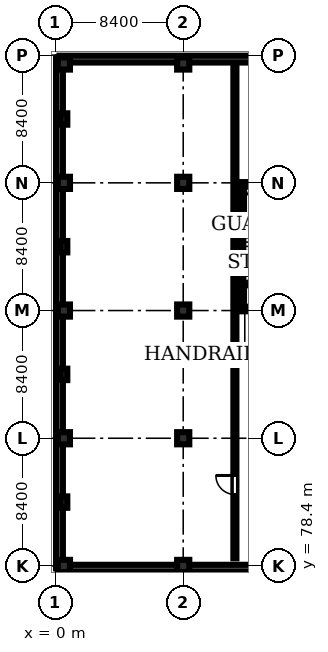
"""IFC4 building model, lengths in metres.
Left out: names, types, materials, properties, quantities, classifications, styles, units other than length and angle.
Written with IfcOpenShell. Run it as: python <this file> out.ifc"""

import sys

from ifc_helpers import new_model, si_unit, direction, frame, frame_2d, origin, origin_2d, place, context, subcontext, project, spatial, rectangle, extrude, element, fill, save


model = new_model("IFC4")
c1 = context("Model", 3, precision=1e-05, world=origin(), true_north=direction((0.0, 1.0)))
c2 = subcontext(c1, "Body", "Model", "MODEL_VIEW")
j1 = project(units=[si_unit("LENGTHUNIT", "METRE"), si_unit("PLANEANGLEUNIT", "RADIAN")], contexts=[c1])
p1 = place(None, origin())
s1 = spatial("IfcSite", under=j1, at=p1, CompositionType="ELEMENT")
p2 = place(p1, origin())
s2 = spatial("IfcBuilding", under=s1, at=p2, CompositionType="ELEMENT")
p3 = place(p2, frame((0.0, 0.0, -4.8)))
s3 = spatial("IfcBuildingStorey", under=s2, at=p3, CompositionType="ELEMENT", Elevation=-4.8)
for number, where, z_axis, x_axis in (
    (1, (0.55, 78.4, 0.0), (0.0, 0.0, 1.0), (1.0, 0.0, 0.0)),
    (2, (0.55, 86.8, 0.0), (0.0, 0.0, 1.0), (1.0, 0.0, 0.0)),
    (3, (0.55, 95.2, 0.0), (0.0, 0.0, 1.0), (1.0, 0.0, 0.0)),
    (4, (0.55, 103.6, 0.0), (0.0, 0.0, 1.0), (1.0, 0.0, 0.0)),
    (5, (0.55, 111.45, 0.0), (0.0, 0.0, 1.0), (1.0, 0.0, 0.0)),
    (6, (8.4, 78.4, 0.0), (0.0, 0.0, 1.0), (1.0, 0.0, 0.0)),
    (7, (8.4, 86.8, 0.0), (0.0, 0.0, 1.0), (1.0, 0.0, 0.0)),
    (8, (8.4, 95.2, 0.0), (0.0, 0.0, 1.0), (1.0, 0.0, 0.0)),
    (9, (8.4, 103.6, 0.0), (0.0, 0.0, 1.0), (1.0, 0.0, 0.0)),
    (10, (8.4, 111.45, 0.0), (0.0, 0.0, 1.0), (1.0, 0.0, 0.0)),
):
    element("IfcColumn", number, at=place(p3, frame(where, z_axis=z_axis, x_axis=x_axis)), inside=s3, PredefinedType="COLUMN", context=c2, shape_type="SweptSolid", body=[
        extrude(rectangle(XDim=0.8, YDim=0.8, at=origin_2d()), origin(), (0.0, 0.0, 1.0), 4.395),
    ])
for number, where, z_axis, x_axis in (
    (11, (0.55, 82.6, 0.0), (0.0, 0.0, 1.0), (1.0, 0.0, 0.0)),
    (12, (0.55, 91.0, 0.0), (0.0, 0.0, 1.0), (1.0, 0.0, 0.0)),
    (13, (0.55, 99.4, 0.0), (0.0, 0.0, 1.0), (1.0, 0.0, 0.0)),
    (14, (0.55, 107.8, 0.0), (0.0, 0.0, 1.0), (1.0, 0.0, 0.0)),
):
    element("IfcColumn", number, at=place(p3, frame(where, z_axis=z_axis, x_axis=x_axis)), inside=s3, PredefinedType="PILASTER", context=c2, shape_type="SweptSolid", body=[
        extrude(rectangle(XDim=0.45, YDim=0.75, at=origin_2d()), origin(), (0.0, 0.0, 1.0), 4.395),
    ])
p4 = place(p3, frame((0.26, 78.25, 0.0), z_axis=(0.0, 0.0, 1.0), x_axis=(1.0, 0.0, 0.0)))
e15 = element("IfcWall", 15, at=p4, inside=s3, PredefinedType="SHEAR", context=c2, shape_type="SweptSolid", body=[
    extrude(rectangle(XDim=138.39, YDim=0.45, at=frame_2d((69.195, 0.0))), origin(), (0.0, 0.0, 1.0), 3.75),
])
p5 = place(p3, frame((163.74, 111.74, 0.0), z_axis=(0.0, 0.0, 1.0), x_axis=(-1.0, 0.0, 0.0)))
e16 = element("IfcWall", 16, at=p5, inside=s3, PredefinedType="SHEAR", context=c2, shape_type="SweptSolid", body=[
    extrude(rectangle(XDim=163.48, YDim=0.45, at=frame_2d((81.74, 0.0))), origin(), (0.0, 0.0, 1.0), 3.75),
])
p6 = place(p3, frame((0.26, 111.74, 0.0), z_axis=(0.0, 0.0, 1.0), x_axis=(0.0, -1.0, 0.0)))
e17 = element("IfcWall", 17, at=p6, inside=s3, PredefinedType="SHEAR", context=c2, shape_type="SweptSolid", body=[
    extrude(rectangle(XDim=33.49, YDim=0.45, at=frame_2d((16.745, 0.0))), origin(), (0.0, 0.0, 1.0), 3.75),
])
p7 = place(p3, frame((12.1, 95.3, 0.0), z_axis=(0.0, 0.0, 1.0), x_axis=(1.0, 0.0, 0.0)))
e18 = element("IfcWall", 18, at=p7, inside=s3, PredefinedType="SHEAR", context=c2, shape_type="SweptSolid", body=[
    extrude(rectangle(XDim=3.7, YDim=0.3, at=frame_2d((1.85, 0.0))), origin(), (0.0, 0.0, 1.0), 4.395),
])
p8 = place(p7, frame((0.95, 0.0, 0.0)))
e19 = element("IfcOpeningElement", 19, at=p8, cuts=e18, PredefinedType="OPENING", context=c2, shape_type="SweptSolid", body=[
    extrude(rectangle(XDim=1.15, YDim=2.15, at=frame_2d((0.575, 1.075))), frame((0.0, 0.16, 0.0), z_axis=(0.0, -1.0, 0.0), x_axis=(1.0, 0.0, 0.0)), (0.0, 0.0, 1.0), 0.32),
])
p9 = place(p3, frame((12.1, 103.5, 0.0), z_axis=(0.0, 0.0, 1.0), x_axis=(1.0, 0.0, 0.0)))
e20 = element("IfcWall", 20, at=p9, inside=s3, PredefinedType="SHEAR", context=c2, shape_type="SweptSolid", body=[
    extrude(rectangle(XDim=3.7, YDim=0.3, at=frame_2d((1.85, 0.0))), origin(), (0.0, 0.0, 1.0), 4.395),
])
p10 = place(p3, frame((12.25, 95.45, 0.0), z_axis=(0.0, 0.0, 1.0), x_axis=(0.0, 1.0, 0.0)))
e21 = element("IfcWall", 21, at=p10, inside=s3, PredefinedType="SHEAR", context=c2, shape_type="SweptSolid", body=[
    extrude(rectangle(XDim=7.9, YDim=0.3, at=frame_2d((3.95, 0.0))), origin(), (0.0, 0.0, 1.0), 4.395),
])
p11 = place(p3, frame((11.8, 78.9, 0.0), z_axis=(0.0, 0.0, 1.0), x_axis=(0.0, 1.0, 0.0)))
e22 = element("IfcWall", 22, at=p11, inside=s3, PredefinedType="SOLIDWALL", context=c2, shape_type="SweptSolid", body=[
    extrude(rectangle(XDim=32.3, YDim=0.2, at=frame_2d((16.15, 0.0))), origin(), (0.0, 0.0, 1.0), 4.395),
])
p12 = place(p11, frame((4.2, 0.0, 0.0)))
e23 = element("IfcOpeningElement", 23, at=p12, cuts=e22, PredefinedType="OPENING", context=c2, shape_type="SweptSolid", body=[
    extrude(rectangle(XDim=1.25, YDim=2.2, at=frame_2d((0.625, 1.1))), frame((0.0, 0.11, 0.0), z_axis=(0.0, -1.0, 0.0), x_axis=(1.0, 0.0, 0.0)), (0.0, 0.0, 1.0), 0.22),
])
p13 = place(p12, origin())
e24 = element("IfcDoor", 24, at=p13, inside=s3, OperationType="SINGLE_SWING_RIGHT", PredefinedType="DOOR", context=c2, shape_type="SweptSolid", body=[
    extrude(rectangle(XDim=1.25, YDim=2.2, at=frame_2d((0.625, 1.1))), frame((0.0, 0.025, 0.0), z_axis=(0.0, -1.0, 0.0), x_axis=(1.0, 0.0, 0.0)), (0.0, 0.0, 1.0), 0.05),
])
fill(e23, e24)
save(model, sys.argv[1])
